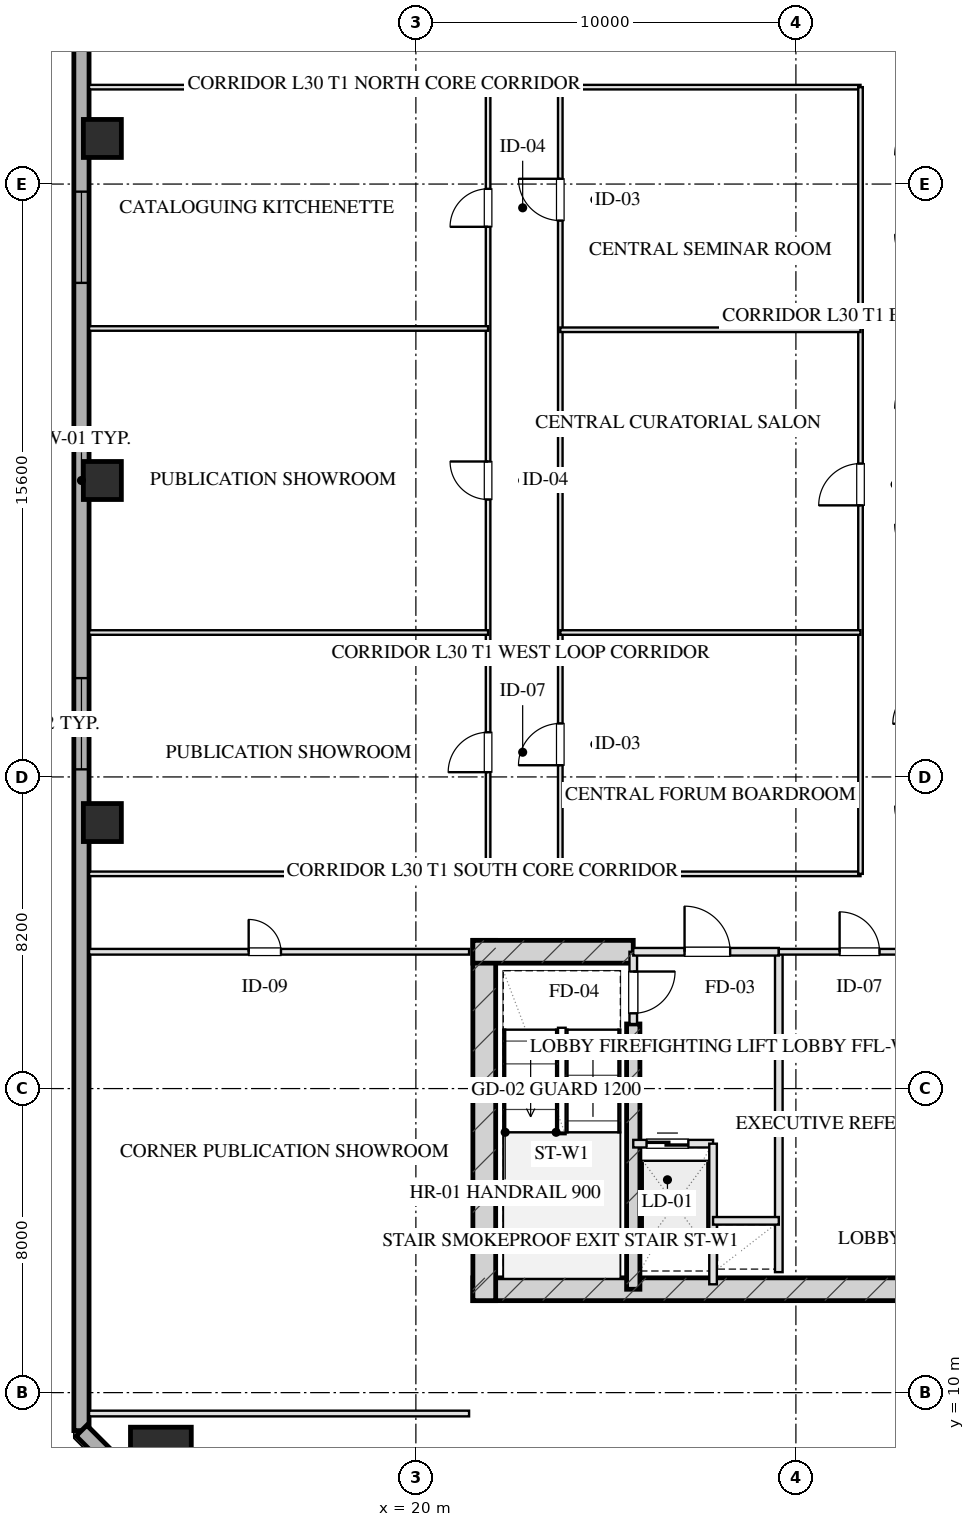
"""IFC4 building model, lengths in metres.
Left out: names, types, materials, properties, quantities, classifications, styles, units other than length and angle.
Written with IfcOpenShell. Run it as: python <this file> out.ifc"""

import sys

from ifc_helpers import new_model, si_unit, direction, frame, frame_2d, origin, origin_2d, place, context, subcontext, project, spatial, rectangle, hollow_rectangle, extrude, element, fill, save


model = new_model("IFC4")
c1 = context("Model", 3, precision=1e-05, world=origin(), true_north=direction((0.0, 1.0)))
c2 = subcontext(c1, "Body", "Model", "MODEL_VIEW")
j1 = project(units=[si_unit("LENGTHUNIT", "METRE"), si_unit("PLANEANGLEUNIT", "RADIAN")], contexts=[c1])
p1 = place(None, origin())
s1 = spatial("IfcSite", under=j1, at=p1, CompositionType="ELEMENT")
p2 = place(p1, origin())
s2 = spatial("IfcBuilding", under=s1, at=p2, CompositionType="ELEMENT")
p3 = place(p2, frame((0.0, 0.0, 117.3)))
s3 = spatial("IfcBuildingStorey", under=s2, at=p3, CompositionType="ELEMENT", Elevation=117.3)
p4 = place(p3, frame((21.5, 12.72, 0.0), z_axis=(0.0, 0.0, 1.0), x_axis=(1.0, 0.0, 0.0)))
e1 = element("IfcWall", 1, at=p4, inside=s3, PredefinedType="SHEAR", context=c2, shape_type="SweptSolid", body=[
    extrude(rectangle(XDim=17.0, YDim=0.6, at=frame_2d((8.5, 0.0))), origin(), (0.0, 0.0, 1.0), 3.45),
])
p5 = place(p3, frame((21.8, 21.9, 0.0), z_axis=(0.0, 0.0, 1.0), x_axis=(0.0, -1.0, 0.0)))
e2 = element("IfcWall", 2, at=p5, inside=s3, PredefinedType="SHEAR", context=c2, shape_type="SweptSolid", body=[
    extrude(rectangle(XDim=9.48, YDim=0.6, at=frame_2d((4.74, 0.0))), origin(), (0.0, 0.0, 1.0), 3.45),
])
p6 = place(p3, frame((25.72, 19.7, 0.0), z_axis=(0.0, 0.0, 1.0), x_axis=(0.0, -1.0, 0.0)))
e3 = element("IfcWall", 3, at=p6, inside=s3, PredefinedType="SHEAR", context=c2, shape_type="SweptSolid", body=[
    extrude(rectangle(XDim=6.98, YDim=0.35, at=frame_2d((3.49, 0.0))), origin(), (0.0, 0.0, 1.0), 3.45),
])
p7 = place(p3, frame((21.5, 21.6, 0.0), z_axis=(0.0, 0.0, 1.0), x_axis=(1.0, 0.0, 0.0)))
e4 = element("IfcWall", 4, at=p7, inside=s3, PredefinedType="SHEAR", context=c2, shape_type="SweptSolid", body=[
    extrude(rectangle(XDim=4.22, YDim=0.6, at=frame_2d((2.11, 0.0))), origin(), (0.0, 0.0, 1.0), 3.45),
])
p8 = place(p3, frame((13.29, 8.29, 0.0), z_axis=(0.0, 0.0, 1.0), x_axis=(1.0, 0.0, 0.0)))
e5 = element("IfcColumn", 5, at=p8, inside=s3, PredefinedType="COLUMN", context=c2, shape_type="SweptSolid", body=[
    extrude(hollow_rectangle(XDim=1.6, YDim=1.6, WallThickness=0.055, at=origin_2d()), origin(), (0.0, 0.0, 1.0), 3.451),
])
for number, where, z_axis, x_axis in (
    (6, (11.75, 25.0, 0.0), (0.0, 0.0, 1.0), (1.0, 0.0, 0.0)),
    (7, (11.75, 34.0, 0.0), (0.0, 0.0, 1.0), (1.0, 0.0, 0.0)),
    (8, (11.75, 43.0, 0.0), (0.0, 0.0, 1.0), (1.0, 0.0, 0.0)),
):
    element("IfcColumn", number, at=place(p3, frame(where, z_axis=z_axis, x_axis=x_axis)), inside=s3, PredefinedType="COLUMN", context=c2, shape_type="SweptSolid", body=[
        extrude(hollow_rectangle(XDim=1.0, YDim=1.0, WallThickness=0.036, at=origin_2d()), origin(), (0.0, 0.0, 1.0), 3.451),
    ])
p9 = place(p3, frame((11.2, 9.0, 0.0), z_axis=(0.0, 0.0, 1.0), x_axis=(0.0, 1.0, 0.0)))
e9 = element("IfcWall", 9, at=p9, inside=s3, PredefinedType="SOLIDWALL", context=c2, shape_type="SweptSolid", body=[
    extrude(rectangle(XDim=50.0, YDim=0.4, at=frame_2d((25.0, 0.0))), origin(), (0.0, 0.0, 1.0), 2.61),
])
p10 = place(p9, frame((17.4, 0.0, 0.75)))
e10 = element("IfcOpeningElement", 10, at=p10, cuts=e9, PredefinedType="OPENING", context=c2, shape_type="SweptSolid", body=[
    extrude(rectangle(XDim=2.4, YDim=1.46, at=frame_2d((1.2, 0.73))), frame((0.0, 0.21, 0.0), z_axis=(0.0, -1.0, 0.0), x_axis=(1.0, 0.0, 0.0)), (0.0, 0.0, 1.0), 0.42),
])
p11 = place(p9, frame((30.2, 0.0, 0.75)))
e11 = element("IfcOpeningElement", 11, at=p11, cuts=e9, PredefinedType="OPENING", context=c2, shape_type="SweptSolid", body=[
    extrude(rectangle(XDim=2.4, YDim=1.46, at=frame_2d((1.2, 0.73))), frame((0.0, 0.21, 0.0), z_axis=(0.0, -1.0, 0.0), x_axis=(1.0, 0.0, 0.0)), (0.0, 0.0, 1.0), 0.42),
])
p12 = place(p3, frame((14.0, 6.2, 0.0), z_axis=(0.0, 0.0, 1.0), x_axis=(-0.707106781187, 0.707106781187, 0.0)))
e12 = element("IfcWall", 12, at=p12, inside=s3, PredefinedType="SOLIDWALL", context=c2, shape_type="SweptSolid", body=[
    extrude(rectangle(XDim=3.96, YDim=0.4, at=frame_2d((1.98, 0.0))), origin(), (0.0, 0.0, 1.0), 2.61),
])
p13 = place(p3, frame((25.72, 21.6, 0.0), z_axis=(0.0, 0.0, 1.0), x_axis=(0.0, -1.0, 0.0)))
e13 = element("IfcWall", 13, at=p13, inside=s3, PredefinedType="PARTITIONING", context=c2, shape_type="SweptSolid", body=[
    extrude(rectangle(XDim=1.9, YDim=0.2, at=frame_2d((0.95, 0.0))), origin(), (0.0, 0.0, 1.0), 3.175),
])
p14 = place(p13, frame((0.52, 0.0, 0.0)))
e14 = element("IfcOpeningElement", 14, at=p14, cuts=e13, PredefinedType="OPENING", context=c2, shape_type="SweptSolid", body=[
    extrude(rectangle(XDim=1.1, YDim=2.05, at=frame_2d((0.55, 1.025))), frame((0.0, 0.11, 0.0), z_axis=(0.0, -1.0, 0.0), x_axis=(1.0, 0.0, 0.0)), (0.0, 0.0, 1.0), 0.22),
])
p15 = place(p3, frame((29.55, 21.6, 0.0), z_axis=(0.0, 0.0, 1.0), x_axis=(0.0, -1.0, 0.0)))
e15 = element("IfcWall", 15, at=p15, inside=s3, PredefinedType="PARTITIONING", context=c2, shape_type="SweptSolid", body=[
    extrude(rectangle(XDim=8.43, YDim=0.2, at=frame_2d((4.215, 0.0))), origin(), (0.0, 0.0, 1.0), 3.175),
])
p16 = place(p3, frame((25.72, 21.6, 0.0), z_axis=(0.0, 0.0, 1.0), x_axis=(1.0, 0.0, 0.0)))
e16 = element("IfcWall", 16, at=p16, inside=s3, PredefinedType="PARTITIONING", context=c2, shape_type="SweptSolid", body=[
    extrude(rectangle(XDim=3.83, YDim=0.2, at=frame_2d((1.915, 0.0))), origin(), (0.0, 0.0, 1.0), 3.175),
])
p17 = place(p16, frame((1.35, 0.0, 0.0)))
e17 = element("IfcOpeningElement", 17, at=p17, cuts=e16, PredefinedType="OPENING", context=c2, shape_type="SweptSolid", body=[
    extrude(rectangle(XDim=1.2, YDim=2.05, at=frame_2d((0.6, 1.025))), frame((0.0, 0.11, 0.0), z_axis=(0.0, -1.0, 0.0), x_axis=(1.0, 0.0, 0.0)), (0.0, 0.0, 1.0), 0.22),
])
p18 = place(p3, frame((25.72, 16.55, 0.0), z_axis=(0.0, 0.0, 1.0), x_axis=(1.0, 0.0, 0.0)))
e18 = element("IfcWall", 18, at=p18, inside=s3, PredefinedType="PARTITIONING", context=c2, shape_type="SweptSolid", body=[
    extrude(rectangle(XDim=2.1, YDim=0.2, at=frame_2d((1.05, 0.0))), origin(), (0.0, 0.0, 1.0), 3.175),
])
p19 = place(p18, frame((0.35, 0.0, 0.0)))
e19 = element("IfcOpeningElement", 19, at=p19, cuts=e18, PredefinedType="OPENING", context=c2, shape_type="SweptSolid", body=[
    extrude(rectangle(XDim=1.1, YDim=2.05, at=frame_2d((0.55, 1.025))), frame((0.0, 0.11, 0.0), z_axis=(0.0, -1.0, 0.0), x_axis=(1.0, 0.0, 0.0)), (0.0, 0.0, 1.0), 0.22),
])
p20 = place(p3, frame((27.82, 16.55, 0.0), z_axis=(0.0, 0.0, 1.0), x_axis=(0.0, -1.0, 0.0)))
e20 = element("IfcWall", 20, at=p20, inside=s3, PredefinedType="PARTITIONING", context=c2, shape_type="SweptSolid", body=[
    extrude(rectangle(XDim=3.7, YDim=0.2, at=frame_2d((1.85, 0.0))), origin(), (0.0, 0.0, 1.0), 3.175),
])
p21 = place(p3, frame((27.82, 14.52, 0.0), z_axis=(0.0, 0.0, 1.0), x_axis=(1.0, 0.0, 0.0)))
e21 = element("IfcWall", 21, at=p21, inside=s3, PredefinedType="PARTITIONING", context=c2, shape_type="SweptSolid", body=[
    extrude(rectangle(XDim=1.73, YDim=0.2, at=frame_2d((0.865, 0.0))), origin(), (0.0, 0.0, 1.0), 3.175),
])
p22 = place(p3, frame((29.55, 21.6, 0.0), z_axis=(0.0, 0.0, 1.0), x_axis=(1.0, 0.0, 0.0)))
e22 = element("IfcWall", 22, at=p22, inside=s3, PredefinedType="PARTITIONING", context=c2, shape_type="SweptSolid", body=[
    extrude(rectangle(XDim=4.4, YDim=0.15, at=frame_2d((2.2, 0.0))), origin(), (0.0, 0.0, 1.0), 3.175),
])
p23 = place(p22, frame((1.6, 0.0, 0.0)))
e23 = element("IfcOpeningElement", 23, at=p23, cuts=e22, PredefinedType="OPENING", context=c2, shape_type="SweptSolid", body=[
    extrude(rectangle(XDim=1.05, YDim=2.05, at=frame_2d((0.525, 1.025))), frame((0.0, 0.085, 0.0), z_axis=(0.0, -1.0, 0.0), x_axis=(1.0, 0.0, 0.0)), (0.0, 0.0, 1.0), 0.17),
])
p24 = place(p3, frame((11.4, 9.45, 0.0), z_axis=(0.0, 0.0, 1.0), x_axis=(1.0, 0.0, 0.0)))
e24 = element("IfcWall", 24, at=p24, inside=s3, PredefinedType="PARTITIONING", context=c2, shape_type="SweptSolid", body=[
    extrude(rectangle(XDim=10.0, YDim=0.15, at=frame_2d((5.0, 0.0))), origin(), (0.0, 0.0, 1.0), 3.175),
])
p25 = place(p3, frame((11.4, 21.6, 0.0), z_axis=(0.0, 0.0, 1.0), x_axis=(1.0, 0.0, 0.0)))
e25 = element("IfcWall", 25, at=p25, inside=s3, PredefinedType="PARTITIONING", context=c2, shape_type="SweptSolid", body=[
    extrude(rectangle(XDim=10.0, YDim=0.15, at=frame_2d((5.0, 0.0))), origin(), (0.0, 0.0, 1.0), 3.175),
])
p26 = place(p25, frame((4.2, 0.0, 0.0)))
e26 = element("IfcOpeningElement", 26, at=p26, cuts=e25, PredefinedType="OPENING", context=c2, shape_type="SweptSolid", body=[
    extrude(rectangle(XDim=0.85, YDim=2.05, at=frame_2d((0.425, 1.025))), frame((0.0, 0.085, 0.0), z_axis=(0.0, -1.0, 0.0), x_axis=(1.0, 0.0, 0.0)), (0.0, 0.0, 1.0), 0.17),
])
p27 = place(p3, frame((11.4, 23.65, 0.0), z_axis=(0.0, 0.0, 1.0), x_axis=(1.0, 0.0, 0.0)))
e27 = element("IfcWall", 27, at=p27, inside=s3, PredefinedType="PARTITIONING", context=c2, shape_type="SweptSolid", body=[
    extrude(rectangle(XDim=10.5, YDim=0.12, at=frame_2d((5.25, 0.0))), origin(), (0.0, 0.0, 1.0), 3.175),
])
p28 = place(p3, frame((23.8, 23.65, 0.0), z_axis=(0.0, 0.0, 1.0), x_axis=(1.0, 0.0, 0.0)))
e28 = element("IfcWall", 28, at=p28, inside=s3, PredefinedType="PARTITIONING", context=c2, shape_type="SweptSolid", body=[
    extrude(rectangle(XDim=7.9, YDim=0.12, at=frame_2d((3.95, 0.0))), origin(), (0.0, 0.0, 1.0), 3.175),
])
p29 = place(p3, frame((11.4, 44.35, 0.0), z_axis=(0.0, 0.0, 1.0), x_axis=(1.0, 0.0, 0.0)))
e29 = element("IfcWall", 29, at=p29, inside=s3, PredefinedType="PARTITIONING", context=c2, shape_type="SweptSolid", body=[
    extrude(rectangle(XDim=10.5, YDim=0.12, at=frame_2d((5.25, 0.0))), origin(), (0.0, 0.0, 1.0), 3.175),
])
p30 = place(p3, frame((23.8, 44.35, 0.0), z_axis=(0.0, 0.0, 1.0), x_axis=(1.0, 0.0, 0.0)))
e30 = element("IfcWall", 30, at=p30, inside=s3, PredefinedType="PARTITIONING", context=c2, shape_type="SweptSolid", body=[
    extrude(rectangle(XDim=7.9, YDim=0.12, at=frame_2d((3.95, 0.0))), origin(), (0.0, 0.0, 1.0), 3.175),
])
p31 = place(p3, frame((21.9, 23.65, 0.0), z_axis=(0.0, 0.0, 1.0), x_axis=(0.0, 1.0, 0.0)))
e31 = element("IfcWall", 31, at=p31, inside=s3, PredefinedType="PARTITIONING", context=c2, shape_type="SweptSolid", body=[
    extrude(rectangle(XDim=20.7, YDim=0.12, at=frame_2d((10.35, 0.0))), origin(), (0.0, 0.0, 1.0), 3.175),
])
p32 = place(p31, frame((2.675, 0.0, 0.0)))
e32 = element("IfcOpeningElement", 32, at=p32, cuts=e31, PredefinedType="OPENING", context=c2, shape_type="SweptSolid", body=[
    extrude(rectangle(XDim=1.05, YDim=2.05, at=frame_2d((0.525, 1.025))), frame((0.0, 0.07, 0.0), z_axis=(0.0, -1.0, 0.0), x_axis=(1.0, 0.0, 0.0)), (0.0, 0.0, 1.0), 0.14),
])
p33 = place(p31, frame((9.85, 0.0, 0.0)))
e33 = element("IfcOpeningElement", 33, at=p33, cuts=e31, PredefinedType="OPENING", context=c2, shape_type="SweptSolid", body=[
    extrude(rectangle(XDim=1.0, YDim=2.05, at=frame_2d((0.5, 1.025))), frame((0.0, 0.07, 0.0), z_axis=(0.0, -1.0, 0.0), x_axis=(1.0, 0.0, 0.0)), (0.0, 0.0, 1.0), 0.14),
])
p34 = place(p31, frame((17.025, 0.0, 0.0)))
e34 = element("IfcOpeningElement", 34, at=p34, cuts=e31, PredefinedType="OPENING", context=c2, shape_type="SweptSolid", body=[
    extrude(rectangle(XDim=1.0, YDim=2.05, at=frame_2d((0.5, 1.025))), frame((0.0, 0.07, 0.0), z_axis=(0.0, -1.0, 0.0), x_axis=(1.0, 0.0, 0.0)), (0.0, 0.0, 1.0), 0.14),
])
p35 = place(p3, frame((23.8, 23.65, 0.0), z_axis=(0.0, 0.0, 1.0), x_axis=(0.0, 1.0, 0.0)))
e35 = element("IfcWall", 35, at=p35, inside=s3, PredefinedType="PARTITIONING", context=c2, shape_type="SweptSolid", body=[
    extrude(rectangle(XDim=20.7, YDim=0.12, at=frame_2d((10.35, 0.0))), origin(), (0.0, 0.0, 1.0), 3.175),
])
p36 = place(p35, frame((2.857, 0.0, 0.0)))
e36 = element("IfcOpeningElement", 36, at=p36, cuts=e35, PredefinedType="OPENING", context=c2, shape_type="SweptSolid", body=[
    extrude(rectangle(XDim=1.1, YDim=2.05, at=frame_2d((0.55, 1.025))), frame((0.0, 0.07, 0.0), z_axis=(0.0, -1.0, 0.0), x_axis=(1.0, 0.0, 0.0)), (0.0, 0.0, 1.0), 0.14),
])
p37 = place(p35, frame((17.189, 0.0, 0.0)))
e37 = element("IfcOpeningElement", 37, at=p37, cuts=e35, PredefinedType="OPENING", context=c2, shape_type="SweptSolid", body=[
    extrude(rectangle(XDim=1.1, YDim=2.05, at=frame_2d((0.55, 1.025))), frame((0.0, 0.07, 0.0), z_axis=(0.0, -1.0, 0.0), x_axis=(1.0, 0.0, 0.0)), (0.0, 0.0, 1.0), 0.14),
])
p38 = place(p3, frame((31.7, 23.65, 0.0), z_axis=(0.0, 0.0, 1.0), x_axis=(0.0, 1.0, 0.0)))
e38 = element("IfcWall", 38, at=p38, inside=s3, PredefinedType="PARTITIONING", context=c2, shape_type="SweptSolid", body=[
    extrude(rectangle(XDim=20.7, YDim=0.12, at=frame_2d((10.35, 0.0))), origin(), (0.0, 0.0, 1.0), 3.175),
])
p39 = place(p38, frame((9.696, 0.0, 0.0)))
e39 = element("IfcOpeningElement", 39, at=p39, cuts=e38, PredefinedType="OPENING", context=c2, shape_type="SweptSolid", body=[
    extrude(rectangle(XDim=1.1, YDim=2.05, at=frame_2d((0.55, 1.025))), frame((0.0, 0.07, 0.0), z_axis=(0.0, -1.0, 0.0), x_axis=(1.0, 0.0, 0.0)), (0.0, 0.0, 1.0), 0.14),
])
for number, where, z_axis, x_axis in (
    (40, (23.8, 30.0, 0.0), (0.0, 0.0, 1.0), (1.0, 0.0, 0.0)),
    (41, (23.8, 37.966, 0.0), (0.0, 0.0, 1.0), (1.0, 0.0, 0.0)),
):
    element("IfcWall", number, at=place(p3, frame(where, z_axis=z_axis, x_axis=x_axis)), inside=s3, PredefinedType="PARTITIONING", context=c2, shape_type="SweptSolid", body=[
        extrude(rectangle(XDim=7.9, YDim=0.12, at=frame_2d((3.95, 0.0))), origin(), (0.0, 0.0, 1.0), 3.175),
    ])
for number, where, z_axis, x_axis in (
    (42, (11.4, 30.0, 0.0), (0.0, 0.0, 1.0), (1.0, 0.0, 0.0)),
    (43, (11.4, 38.0, 0.0), (0.0, 0.0, 1.0), (1.0, 0.0, 0.0)),
):
    element("IfcWall", number, at=place(p3, frame(where, z_axis=z_axis, x_axis=x_axis)), inside=s3, PredefinedType="PARTITIONING", context=c2, shape_type="SweptSolid", body=[
        extrude(rectangle(XDim=10.5, YDim=0.12, at=frame_2d((5.25, 0.0))), origin(), (0.0, 0.0, 1.0), 3.175),
    ])
p40 = place(p10, origin())
e44 = element("IfcWindow", 44, at=p40, inside=s3, PartitioningType="TRIPLE_PANEL_VERTICAL", PredefinedType="WINDOW", context=c2, shape_type="SweptSolid", body=[
    extrude(rectangle(XDim=2.4, YDim=1.46, at=frame_2d((1.2, 0.73))), frame((0.0, 0.03, 0.0), z_axis=(0.0, -1.0, 0.0), x_axis=(1.0, 0.0, 0.0)), (0.0, 0.0, 1.0), 0.06),
])
fill(e10, e44)
p41 = place(p11, origin())
e45 = element("IfcWindow", 45, at=p41, inside=s3, PartitioningType="TRIPLE_PANEL_VERTICAL", PredefinedType="WINDOW", context=c2, shape_type="SweptSolid", body=[
    extrude(rectangle(XDim=2.4, YDim=1.46, at=frame_2d((1.2, 0.73))), frame((0.0, 0.03, 0.0), z_axis=(0.0, -1.0, 0.0), x_axis=(1.0, 0.0, 0.0)), (0.0, 0.0, 1.0), 0.06),
])
fill(e11, e45)
p42 = place(p14, origin())
e46 = element("IfcDoor", 46, at=p42, inside=s3, OperationType="SINGLE_SWING_LEFT", PredefinedType="DOOR", context=c2, shape_type="SweptSolid", body=[
    extrude(rectangle(XDim=1.1, YDim=2.05, at=frame_2d((0.55, 1.025))), frame((0.0, 0.025, 0.0), z_axis=(0.0, -1.0, 0.0), x_axis=(1.0, 0.0, 0.0)), (0.0, 0.0, 1.0), 0.05),
])
fill(e14, e46)
p43 = place(p17, origin())
e47 = element("IfcDoor", 47, at=p43, inside=s3, OperationType="SINGLE_SWING_LEFT", PredefinedType="DOOR", context=c2, shape_type="SweptSolid", body=[
    extrude(rectangle(XDim=1.2, YDim=2.05, at=frame_2d((0.6, 1.025))), frame((0.0, 0.025, 0.0), z_axis=(0.0, -1.0, 0.0), x_axis=(1.0, 0.0, 0.0)), (0.0, 0.0, 1.0), 0.05),
])
fill(e17, e47)
p44 = place(p19, origin())
e48 = element("IfcDoor", 48, at=p44, inside=s3, OperationType="DOUBLE_DOOR_SLIDING", PredefinedType="DOOR", context=c2, shape_type="SweptSolid", body=[
    extrude(rectangle(XDim=1.1, YDim=2.05, at=frame_2d((0.55, 1.025))), frame((0.0, 0.025, 0.0), z_axis=(0.0, -1.0, 0.0), x_axis=(1.0, 0.0, 0.0)), (0.0, 0.0, 1.0), 0.05),
])
fill(e19, e48)
p45 = place(p23, origin())
e49 = element("IfcDoor", 49, at=p45, inside=s3, OperationType="SINGLE_SWING_LEFT", PredefinedType="DOOR", context=c2, shape_type="SweptSolid", body=[
    extrude(rectangle(XDim=1.05, YDim=2.05, at=frame_2d((0.525, 1.025))), frame((0.0, 0.025, 0.0), z_axis=(0.0, -1.0, 0.0), x_axis=(1.0, 0.0, 0.0)), (0.0, 0.0, 1.0), 0.05),
])
fill(e23, e49)
p46 = place(p26, origin())
e50 = element("IfcDoor", 50, at=p46, inside=s3, OperationType="SINGLE_SWING_LEFT", PredefinedType="DOOR", context=c2, shape_type="SweptSolid", body=[
    extrude(rectangle(XDim=0.85, YDim=2.05, at=frame_2d((0.425, 1.025))), frame((0.0, 0.025, 0.0), z_axis=(0.0, -1.0, 0.0), x_axis=(1.0, 0.0, 0.0)), (0.0, 0.0, 1.0), 0.05),
])
fill(e26, e50)
p47 = place(p32, origin())
e51 = element("IfcDoor", 51, at=p47, inside=s3, OperationType="SINGLE_SWING_LEFT", PredefinedType="DOOR", context=c2, shape_type="SweptSolid", body=[
    extrude(rectangle(XDim=1.05, YDim=2.05, at=frame_2d((0.525, 1.025))), frame((0.0, 0.025, 0.0), z_axis=(0.0, -1.0, 0.0), x_axis=(1.0, 0.0, 0.0)), (0.0, 0.0, 1.0), 0.05),
])
fill(e32, e51)
p48 = place(p33, origin())
e52 = element("IfcDoor", 52, at=p48, inside=s3, OperationType="SINGLE_SWING_RIGHT", PredefinedType="DOOR", context=c2, shape_type="SweptSolid", body=[
    extrude(rectangle(XDim=1.0, YDim=2.05, at=frame_2d((0.5, 1.025))), frame((0.0, 0.025, 0.0), z_axis=(0.0, -1.0, 0.0), x_axis=(1.0, 0.0, 0.0)), (0.0, 0.0, 1.0), 0.05),
])
fill(e33, e52)
p49 = place(p34, origin())
e53 = element("IfcDoor", 53, at=p49, inside=s3, OperationType="SINGLE_SWING_LEFT", PredefinedType="DOOR", context=c2, shape_type="SweptSolid", body=[
    extrude(rectangle(XDim=1.0, YDim=2.05, at=frame_2d((0.5, 1.025))), frame((0.0, 0.025, 0.0), z_axis=(0.0, -1.0, 0.0), x_axis=(1.0, 0.0, 0.0)), (0.0, 0.0, 1.0), 0.05),
])
fill(e34, e53)
p50 = place(p36, origin())
e54 = element("IfcDoor", 54, at=p50, inside=s3, OperationType="SINGLE_SWING_LEFT", PredefinedType="DOOR", context=c2, shape_type="SweptSolid", body=[
    extrude(rectangle(XDim=1.1, YDim=2.05, at=frame_2d((0.55, 1.025))), frame((0.0, 0.025, 0.0), z_axis=(0.0, -1.0, 0.0), x_axis=(1.0, 0.0, 0.0)), (0.0, 0.0, 1.0), 0.05),
])
fill(e36, e54)
p51 = place(p37, origin())
e55 = element("IfcDoor", 55, at=p51, inside=s3, OperationType="SINGLE_SWING_RIGHT", PredefinedType="DOOR", context=c2, shape_type="SweptSolid", body=[
    extrude(rectangle(XDim=1.1, YDim=2.05, at=frame_2d((0.55, 1.025))), frame((0.0, 0.025, 0.0), z_axis=(0.0, -1.0, 0.0), x_axis=(1.0, 0.0, 0.0)), (0.0, 0.0, 1.0), 0.05),
])
fill(e37, e55)
p52 = place(p39, origin())
e56 = element("IfcDoor", 56, at=p52, inside=s3, OperationType="SINGLE_SWING_LEFT", PredefinedType="DOOR", context=c2, shape_type="SweptSolid", body=[
    extrude(rectangle(XDim=1.1, YDim=2.05, at=frame_2d((0.55, 1.025))), frame((0.0, 0.025, 0.0), z_axis=(0.0, -1.0, 0.0), x_axis=(1.0, 0.0, 0.0)), (0.0, 0.0, 1.0), 0.05),
])
fill(e39, e56)
save(model, sys.argv[1])
